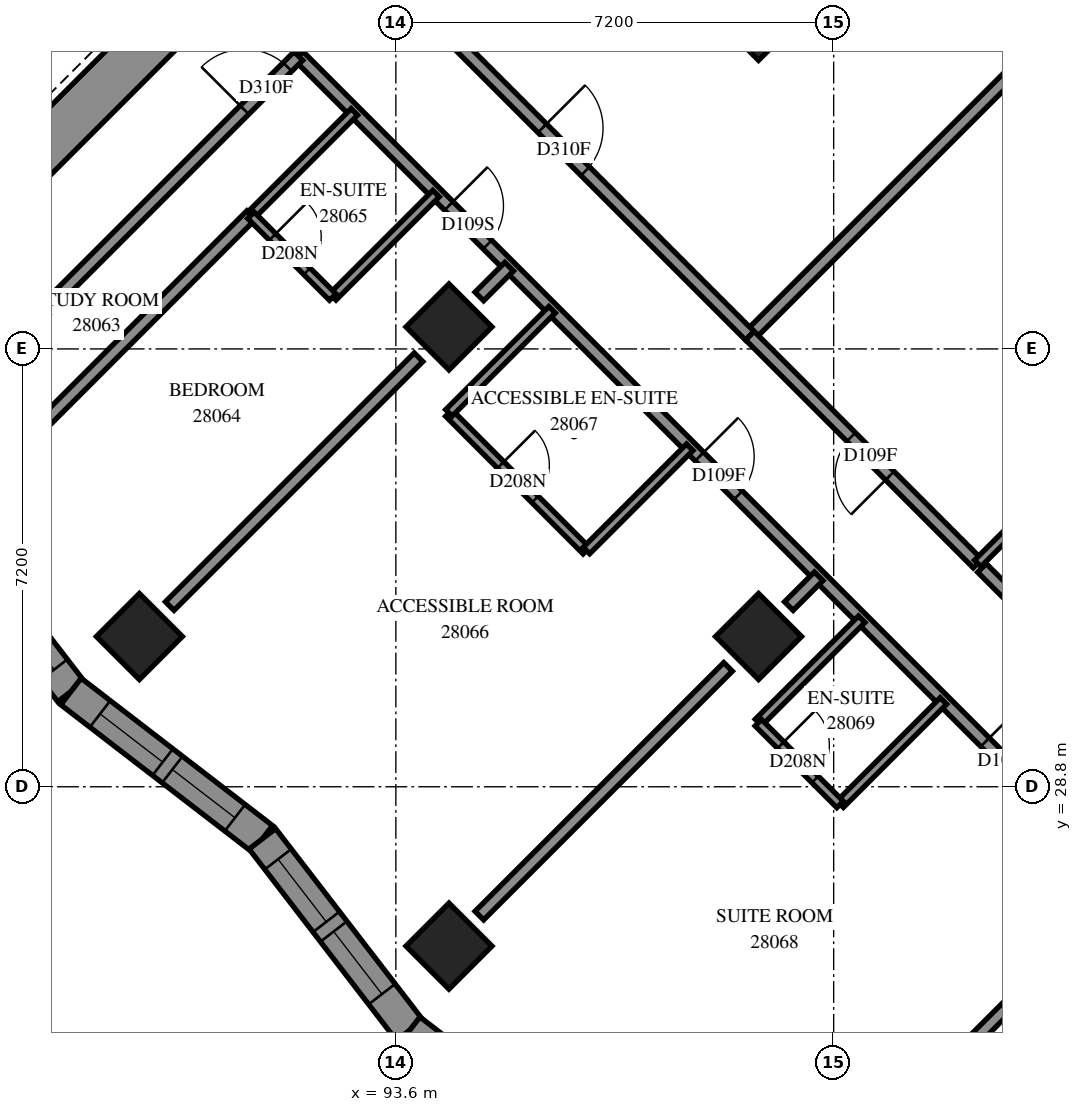
"""IFC4 building model, lengths in metres.
Left out: names, types, materials, properties, quantities, classifications, styles, units other than length and angle.
Written with IfcOpenShell. Run it as: python <this file> out.ifc"""

import sys

from ifc_helpers import new_model, si_unit, direction, frame, frame_2d, origin, origin_2d, place, context, subcontext, project, spatial, polyline, rectangle, outline, extrude, element, fill, save


model = new_model("IFC4")
c1 = context("Model", 3, precision=1e-05, world=origin(), true_north=direction((0.0, 1.0)))
c2 = subcontext(c1, "Body", "Model", "MODEL_VIEW")
j1 = project(units=[si_unit("LENGTHUNIT", "METRE"), si_unit("PLANEANGLEUNIT", "RADIAN")], contexts=[c1])
p1 = place(None, origin())
s1 = spatial("IfcSite", under=j1, at=p1, CompositionType="ELEMENT")
p2 = place(p1, origin())
s2 = spatial("IfcBuilding", under=s1, at=p2, CompositionType="ELEMENT")
p3 = place(p2, frame((0.0, 0.0, 105.0)))
s3 = spatial("IfcBuildingStorey", under=s2, at=p3, CompositionType="ELEMENT", Elevation=105.0)
for number, where, z_axis, x_axis in (
    (1, (99.565, 41.453, 0.0), (0.0, 0.0, 1.0), (0.707, -0.707, 0.0)),
    (2, (94.474, 36.362, 0.0), (0.0, 0.0, 1.0), (0.707, -0.707, 0.0)),
    (3, (89.382, 31.271, 0.0), (0.0, 0.0, 1.0), (0.707, -0.707, 0.0)),
    (4, (99.565, 31.271, 0.0), (0.0, 0.0, 1.0), (0.707, -0.707, 0.0)),
    (5, (94.474, 26.18, 0.0), (0.0, 0.0, 1.0), (0.707, -0.707, 0.0)),
):
    element("IfcColumn", number, at=place(p3, frame(where, z_axis=z_axis, x_axis=x_axis)), inside=s3, PredefinedType="COLUMN", context=c2, shape_type="SweptSolid", body=[
        extrude(rectangle(XDim=1.0, YDim=1.0, at=origin_2d()), origin(), (0.0, 0.0, 1.0), 3.1),
    ])
p4 = place(p3, frame((87.12, 38.625, -0.3), z_axis=(0.0, 0.0, 1.0), x_axis=(0.7071067812, 0.7071067812, 0.0)))
e6 = element("IfcWall", 6, at=p4, inside=s3, PredefinedType="SHEAR", context=c2, shape_type="SweptSolid", body=[
    extrude(rectangle(XDim=14.4, YDim=0.8, at=frame_2d((7.2, 0.0))), origin(), (0.0, 0.0, 1.0), 2.7),
])
p5 = place(p4, frame((4.55, 0.0, 0.3)))
e7 = element("IfcOpeningElement", 7, at=p5, cuts=e6, PredefinedType="OPENING", context=c2, shape_type="SweptSolid", body=[
    extrude(rectangle(XDim=1.1, YDim=2.1, at=frame_2d((0.55, 1.05))), frame((0.0, 0.41, 0.0), z_axis=(0.0, -1.0, 0.0), x_axis=(1.0, 0.0, 0.0)), (0.0, 0.0, 1.0), 0.82),
])
p6 = place(p4, frame((11.35, 0.0, 0.3)))
e8 = element("IfcOpeningElement", 8, at=p6, cuts=e6, PredefinedType="OPENING", context=c2, shape_type="SweptSolid", body=[
    extrude(rectangle(XDim=1.1, YDim=2.1, at=frame_2d((0.55, 1.05))), frame((0.0, 0.41, 0.0), z_axis=(0.0, -1.0, 0.0), x_axis=(1.0, 0.0, 0.0)), (0.0, 0.0, 1.0), 0.82),
])
p7 = place(p3, frame((85.834, 33.514, 0.0), z_axis=(0.0, 0.0, 1.0), x_axis=(0.6100781116, -0.7923412761, 0.0)))
e9 = element("IfcWall", 9, at=p7, inside=s3, PredefinedType="SOLIDWALL", context=c2, shape_type="SweptSolid", body=[
    extrude(outline(polyline([(0.036, -0.275), (4.008, -0.275), (3.937, 0.275), (-0.036, 0.275), (0.036, -0.275)])), origin(), (0.0, 0.0, 1.0), 3.1),
])
p8 = place(p7, frame((0.718, 0.0, 0.5)))
e10 = element("IfcOpeningElement", 10, at=p8, cuts=e9, PredefinedType="OPENING", context=c2, shape_type="SweptSolid", body=[
    extrude(rectangle(XDim=1.3, YDim=2.45, at=frame_2d((0.65, 1.225))), frame((0.0, 0.285, 0.0), z_axis=(0.0, -1.0, 0.0), x_axis=(1.0, 0.0, 0.0)), (0.0, 0.0, 1.0), 0.57),
])
p9 = place(p7, frame((2.218, 0.0, 0.5)))
e11 = element("IfcOpeningElement", 11, at=p9, cuts=e9, PredefinedType="OPENING", context=c2, shape_type="SweptSolid", body=[
    extrude(rectangle(XDim=1.3, YDim=2.45, at=frame_2d((0.65, 1.225))), frame((0.0, 0.285, 0.0), z_axis=(0.0, -1.0, 0.0), x_axis=(1.0, 0.0, 0.0)), (0.0, 0.0, 1.0), 0.57),
])
p10 = place(p3, frame((88.257, 30.367, 0.0), z_axis=(0.0, 0.0, 1.0), x_axis=(0.7923412761, -0.6100781116, 0.0)))
e12 = element("IfcWall", 12, at=p10, inside=s3, PredefinedType="SOLIDWALL", context=c2, shape_type="SweptSolid", body=[
    extrude(outline(polyline([(-0.036, -0.275), (3.937, -0.275), (4.008, 0.275), (0.036, 0.275), (-0.036, -0.275)])), origin(), (0.0, 0.0, 1.0), 3.1),
])
p11 = place(p10, frame((0.604, 0.0, 0.5)))
e13 = element("IfcOpeningElement", 13, at=p11, cuts=e12, PredefinedType="OPENING", context=c2, shape_type="SweptSolid", body=[
    extrude(rectangle(XDim=1.3, YDim=2.45, at=frame_2d((0.65, 1.225))), frame((0.0, 0.285, 0.0), z_axis=(0.0, -1.0, 0.0), x_axis=(1.0, 0.0, 0.0)), (0.0, 0.0, 1.0), 0.57),
])
p12 = place(p10, frame((2.104, 0.0, 0.5)))
e14 = element("IfcOpeningElement", 14, at=p12, cuts=e12, PredefinedType="OPENING", context=c2, shape_type="SweptSolid", body=[
    extrude(rectangle(XDim=1.3, YDim=2.45, at=frame_2d((0.65, 1.225))), frame((0.0, 0.285, 0.0), z_axis=(0.0, -1.0, 0.0), x_axis=(1.0, 0.0, 0.0)), (0.0, 0.0, 1.0), 0.57),
])
p13 = place(p3, frame((91.405, 27.944, 0.0), z_axis=(0.0, 0.0, 1.0), x_axis=(0.6100781116, -0.7923412761, 0.0)))
e15 = element("IfcWall", 15, at=p13, inside=s3, PredefinedType="SOLIDWALL", context=c2, shape_type="SweptSolid", body=[
    extrude(outline(polyline([(0.036, -0.275), (4.008, -0.275), (3.937, 0.275), (-0.036, 0.275), (0.036, -0.275)])), origin(), (0.0, 0.0, 1.0), 3.1),
])
p14 = place(p13, frame((0.423, 0.0, 0.5)))
e16 = element("IfcOpeningElement", 16, at=p14, cuts=e15, PredefinedType="OPENING", context=c2, shape_type="SweptSolid", body=[
    extrude(rectangle(XDim=1.3, YDim=2.45, at=frame_2d((0.65, 1.225))), frame((0.0, 0.285, 0.0), z_axis=(0.0, -1.0, 0.0), x_axis=(1.0, 0.0, 0.0)), (0.0, 0.0, 1.0), 0.57),
])
p15 = place(p13, frame((1.923, 0.0, 0.5)))
e17 = element("IfcOpeningElement", 17, at=p15, cuts=e15, PredefinedType="OPENING", context=c2, shape_type="SweptSolid", body=[
    extrude(rectangle(XDim=1.3, YDim=2.45, at=frame_2d((0.65, 1.225))), frame((0.0, 0.285, 0.0), z_axis=(0.0, -1.0, 0.0), x_axis=(1.0, 0.0, 0.0)), (0.0, 0.0, 1.0), 0.57),
])
p16 = place(p3, frame((93.828, 24.796, 0.0), z_axis=(0.0, 0.0, 1.0), x_axis=(0.7923473889, -0.6100701725, 0.0)))
e18 = element("IfcWall", 18, at=p16, inside=s3, PredefinedType="SOLIDWALL", context=c2, shape_type="SweptSolid", body=[
    extrude(outline(polyline([(-0.036, -0.275), (3.937, -0.275), (4.049, 0.275), (0.036, 0.275), (-0.036, -0.275)])), origin(), (0.0, 0.0, 1.0), 3.1),
])
p17 = place(p16, frame((1.07, 0.0, 0.5)))
e19 = element("IfcOpeningElement", 19, at=p17, cuts=e18, PredefinedType="OPENING", context=c2, shape_type="SweptSolid", body=[
    extrude(rectangle(XDim=1.2, YDim=2.45, at=frame_2d((0.6, 1.225))), frame((0.0, 0.285, 0.0), z_axis=(0.0, -1.0, 0.0), x_axis=(1.0, 0.0, 0.0)), (0.0, 0.0, 1.0), 0.57),
])
p18 = place(p3, frame((92.004, 40.819, 0.0), z_axis=(0.0, 0.0, 1.0), x_axis=(0.7071067812, -0.7071067812, 0.0)))
e20 = element("IfcWall", 20, at=p18, inside=s3, PredefinedType="PARTITIONING", context=c2, shape_type="SweptSolid", body=[
    extrude(rectangle(XDim=19.298, YDim=0.2, at=frame_2d((9.649, 0.0))), origin(), (0.0, 0.0, 1.0), 3.1),
])
p19 = place(p18, frame((3.489, 0.0, 0.0)))
e21 = element("IfcOpeningElement", 21, at=p19, cuts=e20, PredefinedType="OPENING", context=c2, shape_type="SweptSolid", body=[
    extrude(rectangle(XDim=0.9, YDim=2.1, at=frame_2d((0.45, 1.05))), frame((0.0, 0.11, 0.0), z_axis=(0.0, -1.0, 0.0), x_axis=(1.0, 0.0, 0.0)), (0.0, 0.0, 1.0), 0.22),
])
p20 = place(p18, frame((9.319, 0.0, 0.0)))
e22 = element("IfcOpeningElement", 22, at=p20, cuts=e20, PredefinedType="OPENING", context=c2, shape_type="SweptSolid", body=[
    extrude(rectangle(XDim=0.9, YDim=2.1, at=frame_2d((0.45, 1.05))), frame((0.0, 0.11, 0.0), z_axis=(0.0, -1.0, 0.0), x_axis=(1.0, 0.0, 0.0)), (0.0, 0.0, 1.0), 0.22),
])
p21 = place(p18, frame((15.961, 0.0, 0.0)))
e23 = element("IfcOpeningElement", 23, at=p21, cuts=e20, PredefinedType="OPENING", context=c2, shape_type="SweptSolid", body=[
    extrude(rectangle(XDim=0.9, YDim=2.1, at=frame_2d((0.45, 1.05))), frame((0.0, 0.11, 0.0), z_axis=(0.0, -1.0, 0.0), x_axis=(1.0, 0.0, 0.0)), (0.0, 0.0, 1.0), 0.22),
])
p22 = place(p3, frame((99.423, 36.221, 0.0), z_axis=(0.0, 0.0, 1.0), x_axis=(0.7071067812, 0.7071067812, 0.0)))
e24 = element("IfcWall", 24, at=p22, inside=s3, PredefinedType="PARTITIONING", context=c2, shape_type="SweptSolid", body=[
    extrude(rectangle(XDim=12.099, YDim=0.2, at=frame_2d((6.049, 0.0))), origin(), (0.0, 0.0, 1.0), 3.1),
])
p23 = place(p3, frame((93.411, 42.227, 0.0), z_axis=(0.0, 0.0, 1.0), x_axis=(0.7071067812, -0.7071067812, 0.0)))
e25 = element("IfcWall", 25, at=p23, inside=s3, PredefinedType="PARTITIONING", context=c2, shape_type="SweptSolid", body=[
    extrude(rectangle(XDim=8.499, YDim=0.2, at=frame_2d((4.25, 0.0))), origin(), (0.0, 0.0, 1.0), 3.1),
])
p24 = place(p23, frame((3.672, 0.0, 0.0)))
e26 = element("IfcOpeningElement", 26, at=p24, cuts=e25, PredefinedType="OPENING", context=c2, shape_type="SweptSolid", body=[
    extrude(rectangle(XDim=1.0, YDim=2.1, at=frame_2d((0.5, 1.05))), frame((0.0, 0.11, 0.0), z_axis=(0.0, -1.0, 0.0), x_axis=(1.0, 0.0, 0.0)), (0.0, 0.0, 1.0), 0.22),
])
p25 = place(p3, frame((86.835, 35.655, 0.0), z_axis=(0.0, 0.0, 1.0), x_axis=(0.7071067812, 0.7071067812, 0.0)))
e27 = element("IfcWall", 27, at=p25, inside=s3, PredefinedType="PARTITIONING", context=c2, shape_type="SweptSolid", body=[
    extrude(rectangle(XDim=7.3, YDim=0.2, at=frame_2d((3.65, 0.0))), origin(), (0.0, 0.0, 1.0), 3.1),
])
p26 = place(p25, frame((6.046, 0.0, 0.0)))
e28 = element("IfcOpeningElement", 28, at=p26, cuts=e27, PredefinedType="OPENING", context=c2, shape_type="SweptSolid", body=[
    extrude(rectangle(XDim=1.0, YDim=2.1, at=frame_2d((0.5, 1.05))), frame((0.0, 0.11, 0.0), z_axis=(0.0, -1.0, 0.0), x_axis=(1.0, 0.0, 0.0)), (0.0, 0.0, 1.0), 0.22),
])
p27 = place(p3, frame((86.336, 33.313, 0.0), z_axis=(0.0, 0.0, 1.0), x_axis=(0.7069620306, 0.7072515022, 0.0)))
e29 = element("IfcWall", 29, at=p27, inside=s3, PredefinedType="PARTITIONING", context=c2, shape_type="SweptSolid", body=[
    extrude(rectangle(XDim=6.909, YDim=0.2, at=frame_2d((3.454, 0.0))), origin(), (0.0, 0.0, 1.0), 3.1),
])
p28 = place(p3, frame((89.881, 31.771, 0.0), z_axis=(0.0, 0.0, 1.0), x_axis=(0.7071067812, 0.7071067812, 0.0)))
e30 = element("IfcWall", 30, at=p28, inside=s3, PredefinedType="PARTITIONING", context=c2, shape_type="SweptSolid", body=[
    extrude(rectangle(XDim=5.787, YDim=0.2, at=frame_2d((2.893, 0.0))), origin(), (0.0, 0.0, 1.0), 3.1),
])
p29 = place(p3, frame((100.063, 21.589, 0.0), z_axis=(0.0, 0.0, 1.0), x_axis=(0.7071067812, 0.7071067812, 0.0)))
e31 = element("IfcWall", 31, at=p29, inside=s3, PredefinedType="PARTITIONING", context=c2, shape_type="SweptSolid", body=[
    extrude(rectangle(XDim=5.787, YDim=0.2, at=frame_2d((2.893, 0.0))), origin(), (0.0, 0.0, 1.0), 2.6),
])
p30 = place(p3, frame((94.973, 26.681, 0.0), z_axis=(0.0, 0.0, 1.0), x_axis=(0.7071067812, 0.7071067812, 0.0)))
e32 = element("IfcWall", 32, at=p30, inside=s3, PredefinedType="PARTITIONING", context=c2, shape_type="SweptSolid", body=[
    extrude(rectangle(XDim=5.784, YDim=0.2, at=frame_2d((2.892, 0.0))), origin(), (0.0, 0.0, 1.0), 3.1),
])
p31 = place(p3, frame((103.239, 32.399, 0.0), z_axis=(0.0, 0.0, 1.0), x_axis=(0.7071067812, -0.7071067812, 0.0)))
e33 = element("IfcWall", 33, at=p31, inside=s3, PredefinedType="PARTITIONING", context=c2, shape_type="SweptSolid", body=[
    extrude(rectangle(XDim=5.399, YDim=0.2, at=frame_2d((2.7, 0.0))), origin(), (0.0, 0.0, 1.0), 3.1),
])
p32 = place(p31, frame((2.15, 0.0, 0.0)))
e34 = element("IfcOpeningElement", 34, at=p32, cuts=e33, PredefinedType="OPENING", context=c2, shape_type="SweptSolid", body=[
    extrude(rectangle(XDim=0.9, YDim=2.1, at=frame_2d((0.45, 1.05))), frame((0.0, 0.11, 0.0), z_axis=(0.0, -1.0, 0.0), x_axis=(1.0, 0.0, 0.0)), (0.0, 0.0, 1.0), 0.22),
])
p33 = place(p3, frame((103.168, 32.47, 0.0), z_axis=(0.0, 0.0, 1.0), x_axis=(-0.7067858967, 0.7074275201, 0.0)))
e35 = element("IfcWall", 35, at=p33, inside=s3, PredefinedType="PARTITIONING", context=c2, shape_type="SweptSolid", body=[
    extrude(rectangle(XDim=5.299, YDim=0.2, at=frame_2d((2.65, 0.0))), origin(), (0.0, 0.0, 1.0), 3.1),
])
p34 = place(p33, frame((2.043, 0.0, 0.0)))
e36 = element("IfcOpeningElement", 36, at=p34, cuts=e35, PredefinedType="OPENING", context=c2, shape_type="SweptSolid", body=[
    extrude(rectangle(XDim=0.9, YDim=2.1, at=frame_2d((0.45, 1.05))), frame((0.0, 0.11, 0.0), z_axis=(0.0, -1.0, 0.0), x_axis=(1.0, 0.0, 0.0)), (0.0, 0.0, 1.0), 0.22),
])
p35 = place(p3, frame((94.471, 34.945, 0.0), z_axis=(0.0, 0.0, 1.0), x_axis=(0.7067942478, -0.7074191764, 0.0)))
e37 = element("IfcWall", 37, at=p35, inside=s3, PredefinedType="PARTITIONING", context=c2, shape_type="SweptSolid", body=[
    extrude(rectangle(XDim=3.2, YDim=0.15, at=frame_2d((1.6, 0.0))), origin(), (0.0, 0.0, 1.0), 3.1),
])
p36 = place(p35, frame((1.206, 0.0, 0.0)))
e38 = element("IfcOpeningElement", 38, at=p36, cuts=e37, PredefinedType="OPENING", context=c2, shape_type="SweptSolid", body=[
    extrude(rectangle(XDim=0.8, YDim=2.1, at=frame_2d((0.4, 1.05))), frame((0.0, 0.085, 0.0), z_axis=(0.0, -1.0, 0.0), x_axis=(1.0, 0.0, 0.0)), (0.0, 0.0, 1.0), 0.17),
])
for number, where, z_axis, x_axis in (
    (39, (92.563, 36.857, 0.0), (0.0, 0.0, 1.0), (0.707, 0.707, 0.0)),
    (40, (91.219, 38.201, 0.0), (0.0, 0.0, 1.0), (0.707, 0.707, 0.0)),
    (41, (96.735, 32.685, 0.0), (0.0, 0.0, 1.0), (0.707, 0.707, 0.0)),
    (42, (103.169, 32.473, 0.0), (0.0, 0.0, 1.0), (0.707, 0.707, 0.0)),
    (43, (99.563, 29.857, 0.0), (0.0, 0.0, 1.0), (0.707, 0.707, 0.0)),
    (44, (100.907, 28.513, 0.0), (0.0, 0.0, 1.0), (0.707, 0.707, 0.0)),
):
    element("IfcWall", number, at=place(p3, frame(where, z_axis=z_axis, x_axis=x_axis)), inside=s3, PredefinedType="PARTITIONING", context=c2, shape_type="SweptSolid", body=[
        extrude(rectangle(XDim=2.401, YDim=0.15, at=frame_2d((1.201, 0.0))), origin(), (0.0, 0.0, 1.0), 3.1),
    ])
p37 = place(p3, frame((94.473, 34.949, 0.0), z_axis=(0.0, 0.0, 1.0), x_axis=(0.7071067812, 0.7071067812, 0.0)))
e45 = element("IfcWall", 45, at=p37, inside=s3, PredefinedType="PARTITIONING", context=c2, shape_type="SweptSolid", body=[
    extrude(rectangle(XDim=2.398, YDim=0.15, at=frame_2d((1.199, 0.0))), origin(), (0.0, 0.0, 1.0), 3.1),
])
p38 = place(p3, frame((99.561, 29.853, 0.0), z_axis=(0.0, 0.0, 1.0), x_axis=(0.7071067812, -0.7071067812, 0.0)))
e46 = element("IfcWall", 46, at=p38, inside=s3, PredefinedType="PARTITIONING", context=c2, shape_type="SweptSolid", body=[
    extrude(rectangle(XDim=1.901, YDim=0.15, at=frame_2d((0.95, 0.0))), origin(), (0.0, 0.0, 1.0), 3.1),
])
p39 = place(p38, frame((0.519, 0.0, 0.0)))
e47 = element("IfcOpeningElement", 47, at=p39, cuts=e46, PredefinedType="OPENING", context=c2, shape_type="SweptSolid", body=[
    extrude(rectangle(XDim=0.8, YDim=2.1, at=frame_2d((0.4, 1.05))), frame((0.0, 0.085, 0.0), z_axis=(0.0, -1.0, 0.0), x_axis=(1.0, 0.0, 0.0)), (0.0, 0.0, 1.0), 0.17),
])
p40 = place(p3, frame((91.217, 38.197, 0.0), z_axis=(0.0, 0.0, 1.0), x_axis=(0.7071067812, -0.7071067812, 0.0)))
e48 = element("IfcWall", 48, at=p40, inside=s3, PredefinedType="PARTITIONING", context=c2, shape_type="SweptSolid", body=[
    extrude(rectangle(XDim=1.901, YDim=0.15, at=frame_2d((0.95, 0.0))), origin(), (0.0, 0.0, 1.0), 3.1),
])
p41 = place(p40, frame((0.502, 0.0, 0.0)))
e49 = element("IfcOpeningElement", 49, at=p41, cuts=e48, PredefinedType="OPENING", context=c2, shape_type="SweptSolid", body=[
    extrude(rectangle(XDim=0.8, YDim=2.1, at=frame_2d((0.4, 1.05))), frame((0.0, 0.085, 0.0), z_axis=(0.0, -1.0, 0.0), x_axis=(1.0, 0.0, 0.0)), (0.0, 0.0, 1.0), 0.17),
])
for number, where, z_axis, x_axis in (
    (50, (94.973, 36.863, 0.0), (0.0, 0.0, 1.0), (0.707, 0.707, 0.0)),
    (51, (100.063, 31.771, 0.0), (0.0, 0.0, 1.0), (0.707, 0.707, 0.0)),
):
    element("IfcWall", number, at=place(p3, frame(where, z_axis=z_axis, x_axis=x_axis)), inside=s3, PredefinedType="PARTITIONING", context=c2, shape_type="SweptSolid", body=[
        extrude(rectangle(XDim=0.693, YDim=0.2, at=frame_2d((0.346, 0.0))), origin(), (0.0, 0.0, 1.0), 3.1),
    ])
p42 = place(p9, origin())
e52 = element("IfcWindow", 52, at=p42, inside=s3, PartitioningType="SINGLE_PANEL", PredefinedType="WINDOW", context=c2, shape_type="SweptSolid", body=[
    extrude(rectangle(XDim=1.3, YDim=2.45, at=frame_2d((0.65, 1.225))), frame((0.0, 0.155, 0.0), z_axis=(0.0, -1.0, 0.0), x_axis=(1.0, 0.0, 0.0)), (0.0, 0.0, 1.0), 0.06),
])
fill(e11, e52)
p43 = place(p11, origin())
e53 = element("IfcWindow", 53, at=p43, inside=s3, PartitioningType="SINGLE_PANEL", PredefinedType="WINDOW", context=c2, shape_type="SweptSolid", body=[
    extrude(rectangle(XDim=1.3, YDim=2.45, at=frame_2d((0.65, 1.225))), frame((0.0, 0.155, 0.0), z_axis=(0.0, -1.0, 0.0), x_axis=(1.0, 0.0, 0.0)), (0.0, 0.0, 1.0), 0.06),
])
fill(e13, e53)
p44 = place(p12, origin())
e54 = element("IfcWindow", 54, at=p44, inside=s3, PartitioningType="SINGLE_PANEL", PredefinedType="WINDOW", context=c2, shape_type="SweptSolid", body=[
    extrude(rectangle(XDim=1.3, YDim=2.45, at=frame_2d((0.65, 1.225))), frame((0.0, 0.155, 0.0), z_axis=(0.0, -1.0, 0.0), x_axis=(1.0, 0.0, 0.0)), (0.0, 0.0, 1.0), 0.06),
])
fill(e14, e54)
p45 = place(p14, origin())
e55 = element("IfcWindow", 55, at=p45, inside=s3, PartitioningType="SINGLE_PANEL", PredefinedType="WINDOW", context=c2, shape_type="SweptSolid", body=[
    extrude(rectangle(XDim=1.3, YDim=2.45, at=frame_2d((0.65, 1.225))), frame((0.0, 0.155, 0.0), z_axis=(0.0, -1.0, 0.0), x_axis=(1.0, 0.0, 0.0)), (0.0, 0.0, 1.0), 0.06),
])
fill(e16, e55)
p46 = place(p15, origin())
e56 = element("IfcWindow", 56, at=p46, inside=s3, PartitioningType="SINGLE_PANEL", PredefinedType="WINDOW", context=c2, shape_type="SweptSolid", body=[
    extrude(rectangle(XDim=1.3, YDim=2.45, at=frame_2d((0.65, 1.225))), frame((0.0, 0.155, 0.0), z_axis=(0.0, -1.0, 0.0), x_axis=(1.0, 0.0, 0.0)), (0.0, 0.0, 1.0), 0.06),
])
fill(e17, e56)
p47 = place(p24, origin())
e57 = element("IfcDoor", 57, at=p47, inside=s3, OperationType="SINGLE_SWING_RIGHT", PredefinedType="DOOR", context=c2, shape_type="SweptSolid", body=[
    extrude(rectangle(XDim=1.0, YDim=2.1, at=frame_2d((0.5, 1.05))), frame((0.0, 0.025, 0.0), z_axis=(0.0, -1.0, 0.0), x_axis=(1.0, 0.0, 0.0)), (0.0, 0.0, 1.0), 0.05),
])
fill(e26, e57)
p48 = place(p34, origin())
e58 = element("IfcDoor", 58, at=p48, inside=s3, OperationType="SINGLE_SWING_RIGHT", PredefinedType="DOOR", context=c2, shape_type="SweptSolid", body=[
    extrude(rectangle(XDim=0.9, YDim=2.1, at=frame_2d((0.45, 1.05))), frame((0.0, 0.025, 0.0), z_axis=(0.0, -1.0, 0.0), x_axis=(1.0, 0.0, 0.0)), (0.0, 0.0, 1.0), 0.05),
])
fill(e36, e58)
p49 = place(p26, origin())
e59 = element("IfcDoor", 59, at=p49, inside=s3, OperationType="SINGLE_SWING_RIGHT", PredefinedType="DOOR", context=c2, shape_type="SweptSolid", body=[
    extrude(rectangle(XDim=1.0, YDim=2.1, at=frame_2d((0.5, 1.05))), frame((0.0, 0.025, 0.0), z_axis=(0.0, -1.0, 0.0), x_axis=(1.0, 0.0, 0.0)), (0.0, 0.0, 1.0), 0.05),
])
fill(e28, e59)
p50 = place(p19, origin())
e60 = element("IfcDoor", 60, at=p50, inside=s3, OperationType="SINGLE_SWING_LEFT", PredefinedType="DOOR", context=c2, shape_type="SweptSolid", body=[
    extrude(rectangle(XDim=0.9, YDim=2.1, at=frame_2d((0.45, 1.05))), frame((0.0, 0.025, 0.0), z_axis=(0.0, -1.0, 0.0), x_axis=(1.0, 0.0, 0.0)), (0.0, 0.0, 1.0), 0.05),
])
fill(e21, e60)
p51 = place(p41, origin())
e61 = element("IfcDoor", 61, at=p51, inside=s3, OperationType="SINGLE_SWING_RIGHT", PredefinedType="DOOR", context=c2, shape_type="SweptSolid", body=[
    extrude(rectangle(XDim=0.8, YDim=2.1, at=frame_2d((0.4, 1.05))), frame((0.0, 0.025, 0.0), z_axis=(0.0, -1.0, 0.0), x_axis=(1.0, 0.0, 0.0)), (0.0, 0.0, 1.0), 0.05),
])
fill(e49, e61)
p52 = place(p20, origin())
e62 = element("IfcDoor", 62, at=p52, inside=s3, OperationType="SINGLE_SWING_RIGHT", PredefinedType="DOOR", context=c2, shape_type="SweptSolid", body=[
    extrude(rectangle(XDim=0.9, YDim=2.1, at=frame_2d((0.45, 1.05))), frame((0.0, 0.025, 0.0), z_axis=(0.0, -1.0, 0.0), x_axis=(1.0, 0.0, 0.0)), (0.0, 0.0, 1.0), 0.05),
])
fill(e22, e62)
p53 = place(p36, origin())
e63 = element("IfcDoor", 63, at=p53, inside=s3, OperationType="SINGLE_SWING_RIGHT", PredefinedType="DOOR", context=c2, shape_type="SweptSolid", body=[
    extrude(rectangle(XDim=0.8, YDim=2.1, at=frame_2d((0.4, 1.05))), frame((0.0, 0.025, 0.0), z_axis=(0.0, -1.0, 0.0), x_axis=(1.0, 0.0, 0.0)), (0.0, 0.0, 1.0), 0.05),
])
fill(e38, e63)
p54 = place(p21, origin())
e64 = element("IfcDoor", 64, at=p54, inside=s3, OperationType="SINGLE_SWING_RIGHT", PredefinedType="DOOR", context=c2, shape_type="SweptSolid", body=[
    extrude(rectangle(XDim=0.9, YDim=2.1, at=frame_2d((0.45, 1.05))), frame((0.0, 0.025, 0.0), z_axis=(0.0, -1.0, 0.0), x_axis=(1.0, 0.0, 0.0)), (0.0, 0.0, 1.0), 0.05),
])
fill(e23, e64)
p55 = place(p39, origin())
e65 = element("IfcDoor", 65, at=p55, inside=s3, OperationType="SINGLE_SWING_RIGHT", PredefinedType="DOOR", context=c2, shape_type="SweptSolid", body=[
    extrude(rectangle(XDim=0.8, YDim=2.1, at=frame_2d((0.4, 1.05))), frame((0.0, 0.025, 0.0), z_axis=(0.0, -1.0, 0.0), x_axis=(1.0, 0.0, 0.0)), (0.0, 0.0, 1.0), 0.05),
])
fill(e47, e65)
save(model, sys.argv[1])
